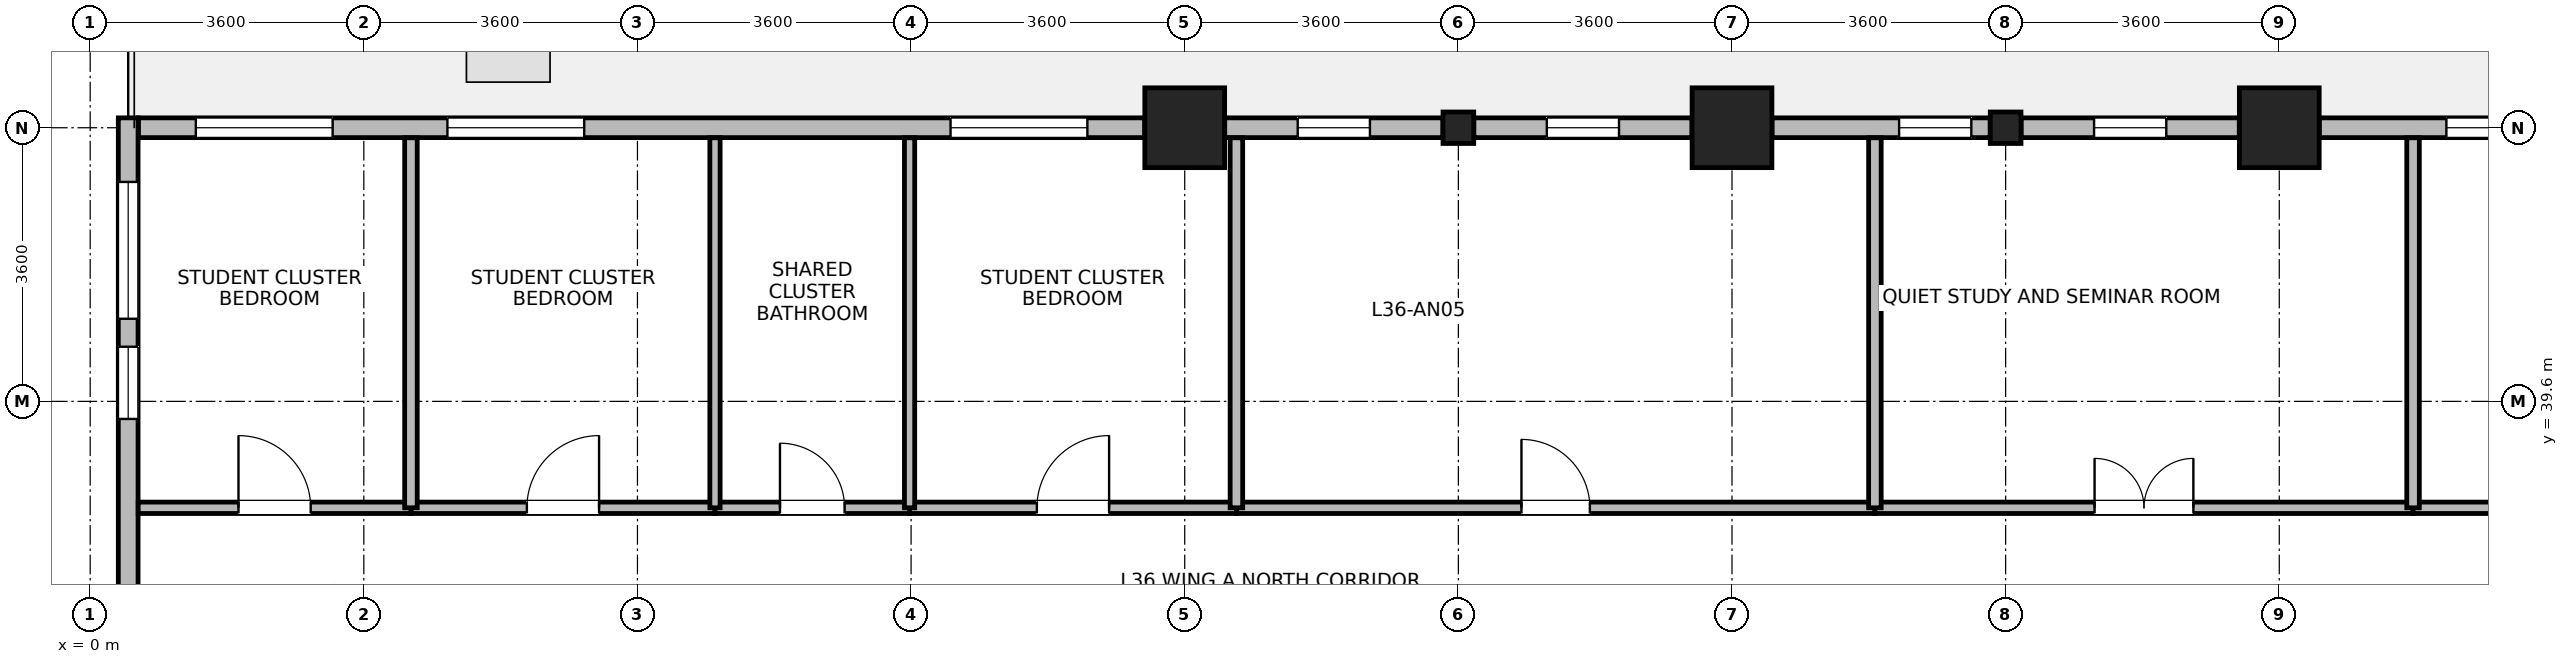
"""IFC4 building model, lengths in metres.
Left out: names, types, materials, properties, quantities, classifications, styles, units other than length and angle.
Written with IfcOpenShell. Run it as: python <this file> out.ifc"""

import sys

from ifc_helpers import new_model, si_unit, direction, frame, frame_2d, origin, origin_2d, place, context, subcontext, project, spatial, rectangle, i_section, extrude, source, transform, mapped, element, fill, save


model = new_model("IFC4")
c1 = context("Model", 3, precision=1e-05, world=origin(), true_north=direction((0.0, 1.0)))
c2 = subcontext(c1, "Body", "Model", "MODEL_VIEW")
j1 = project(units=[si_unit("LENGTHUNIT", "METRE"), si_unit("PLANEANGLEUNIT", "RADIAN")], contexts=[c1])
p1 = place(None, origin())
s1 = spatial("IfcSite", under=j1, at=p1, CompositionType="ELEMENT")
p2 = place(p1, origin())
s2 = spatial("IfcBuilding", under=s1, at=p2, CompositionType="ELEMENT")
p3 = place(p2, frame((0.0, 0.0, 143.9)))
s3 = spatial("IfcBuildingStorey", under=s2, at=p3, CompositionType="ELEMENT", Elevation=143.9)
m1 = source(origin(), c2, "Body", "SweptSolid", [
    extrude(rectangle(XDim=1.05, YDim=1.05, at=origin_2d()), origin(), (0.0, 0.0, 1.0), 3.7),
])
for number, where, z_axis, x_axis in (
    (1, (14.4, 43.2, 0.0), (0.0, 0.0, 1.0), (1.0, 0.0, 0.0)),
    (2, (21.6, 43.2, 0.0), (0.0, 0.0, 1.0), (1.0, 0.0, 0.0)),
    (3, (28.8, 43.2, 0.0), (0.0, 0.0, 1.0), (1.0, 0.0, 0.0)),
):
    element("IfcColumn", number, at=place(p3, frame(where, z_axis=z_axis, x_axis=x_axis)), inside=s3, PredefinedType="COLUMN", context=c2, shape_type="MappedRepresentation", body=[
        mapped(m1, transform((0.0, 0.0, 0.0), x_axis=(1.0, 0.0, 0.0), y_axis=(0.0, 1.0, 0.0), z_axis=(0.0, 0.0, 1.0), scale=1.0)),
    ])
m2 = source(origin(), c2, "Body", "SweptSolid", [
    extrude(i_section(OverallWidth=0.404, OverallDepth=0.414, WebThickness=0.021, FlangeThickness=0.028, FilletRadius=0.015, at=origin_2d()), origin(), (0.0, 0.0, 1.0), 3.7),
])
for number, where, z_axis, x_axis in (
    (4, (18.0, 43.2, 0.0), (0.0, 0.0, 1.0), (1.0, 0.0, 0.0)),
    (5, (25.2, 43.2, 0.0), (0.0, 0.0, 1.0), (1.0, 0.0, 0.0)),
):
    element("IfcColumn", number, at=place(p3, frame(where, z_axis=z_axis, x_axis=x_axis)), inside=s3, PredefinedType="COLUMN", context=c2, shape_type="MappedRepresentation", body=[
        mapped(m2, transform((0.0, 0.0, 0.0), x_axis=(1.0, 0.0, 0.0), y_axis=(0.0, 1.0, 0.0), z_axis=(0.0, 0.0, 1.0), scale=1.0)),
    ])
p4 = place(p3, frame((29.326, 43.2, 0.0), z_axis=(0.0, 0.0, 1.0), x_axis=(1.0, 0.0, 0.0)))
e6 = element("IfcWall", 6, at=p4, inside=s3, PredefinedType="STANDARD", context=c2, shape_type="SweptSolid", body=[
    extrude(rectangle(XDim=2.871, YDim=0.26, at=frame_2d((1.436, 0.0))), origin(), (0.0, 0.0, 1.0), 2.99),
])
p5 = place(p4, frame((1.673, 0.0, 0.85)))
e7 = element("IfcOpeningElement", 7, at=p5, cuts=e6, PredefinedType="OPENING", context=c2, shape_type="SweptSolid", body=[
    extrude(rectangle(XDim=0.95, YDim=1.75, at=frame_2d((0.475, 0.875))), frame((0.0, 0.14, 0.0), z_axis=(0.0, -1.0, 0.0), x_axis=(1.0, 0.0, 0.0)), (0.0, 0.0, 1.0), 0.28),
])
p6 = place(p3, frame((25.403, 43.2, 0.0), z_axis=(0.0, 0.0, 1.0), x_axis=(1.0, 0.0, 0.0)))
e8 = element("IfcWall", 8, at=p6, inside=s3, PredefinedType="STANDARD", context=c2, shape_type="SweptSolid", body=[
    extrude(rectangle(XDim=2.871, YDim=0.26, at=frame_2d((1.436, 0.0))), origin(), (0.0, 0.0, 1.0), 2.99),
])
p7 = place(p6, frame((0.96, 0.0, 0.85)))
e9 = element("IfcOpeningElement", 9, at=p7, cuts=e8, PredefinedType="OPENING", context=c2, shape_type="SweptSolid", body=[
    extrude(rectangle(XDim=0.95, YDim=1.75, at=frame_2d((0.475, 0.875))), frame((0.0, 0.14, 0.0), z_axis=(0.0, -1.0, 0.0), x_axis=(1.0, 0.0, 0.0)), (0.0, 0.0, 1.0), 0.28),
])
p8 = place(p3, frame((22.126, 43.2, 0.0), z_axis=(0.0, 0.0, 1.0), x_axis=(1.0, 0.0, 0.0)))
e10 = element("IfcWall", 10, at=p8, inside=s3, PredefinedType="STANDARD", context=c2, shape_type="SweptSolid", body=[
    extrude(rectangle(XDim=2.871, YDim=0.26, at=frame_2d((1.436, 0.0))), origin(), (0.0, 0.0, 1.0), 2.99),
])
p9 = place(p8, frame((1.673, 0.0, 0.85)))
e11 = element("IfcOpeningElement", 11, at=p9, cuts=e10, PredefinedType="OPENING", context=c2, shape_type="SweptSolid", body=[
    extrude(rectangle(XDim=0.95, YDim=1.75, at=frame_2d((0.475, 0.875))), frame((0.0, 0.14, 0.0), z_axis=(0.0, -1.0, 0.0), x_axis=(1.0, 0.0, 0.0)), (0.0, 0.0, 1.0), 0.28),
])
p10 = place(p3, frame((18.203, 43.2, 0.0), z_axis=(0.0, 0.0, 1.0), x_axis=(1.0, 0.0, 0.0)))
e12 = element("IfcWall", 12, at=p10, inside=s3, PredefinedType="STANDARD", context=c2, shape_type="SweptSolid", body=[
    extrude(rectangle(XDim=2.871, YDim=0.26, at=frame_2d((1.436, 0.0))), origin(), (0.0, 0.0, 1.0), 2.99),
])
p11 = place(p10, frame((0.96, 0.0, 0.85)))
e13 = element("IfcOpeningElement", 13, at=p11, cuts=e12, PredefinedType="OPENING", context=c2, shape_type="SweptSolid", body=[
    extrude(rectangle(XDim=0.95, YDim=1.75, at=frame_2d((0.475, 0.875))), frame((0.0, 0.14, 0.0), z_axis=(0.0, -1.0, 0.0), x_axis=(1.0, 0.0, 0.0)), (0.0, 0.0, 1.0), 0.28),
])
p12 = place(p3, frame((14.926, 43.2, 0.0), z_axis=(0.0, 0.0, 1.0), x_axis=(1.0, 0.0, 0.0)))
e14 = element("IfcWall", 14, at=p12, inside=s3, PredefinedType="STANDARD", context=c2, shape_type="SweptSolid", body=[
    extrude(rectangle(XDim=2.871, YDim=0.26, at=frame_2d((1.436, 0.0))), origin(), (0.0, 0.0, 1.0), 2.99),
])
p13 = place(p12, frame((0.96, 0.0, 0.85)))
e15 = element("IfcOpeningElement", 15, at=p13, cuts=e14, PredefinedType="OPENING", context=c2, shape_type="SweptSolid", body=[
    extrude(rectangle(XDim=0.95, YDim=1.75, at=frame_2d((0.475, 0.875))), frame((0.0, 0.14, 0.0), z_axis=(0.0, -1.0, 0.0), x_axis=(1.0, 0.0, 0.0)), (0.0, 0.0, 1.0), 0.28),
])
p14 = place(p3, frame((0.635, 43.2, 0.0), z_axis=(0.0, 0.0, 1.0), x_axis=(1.0, 0.0, 0.0)))
e16 = element("IfcWall", 16, at=p14, inside=s3, PredefinedType="STANDARD", context=c2, shape_type="SweptSolid", body=[
    extrude(rectangle(XDim=13.239, YDim=0.26, at=frame_2d((6.62, 0.0))), origin(), (0.0, 0.0, 1.0), 3.44),
])
p15 = place(p14, frame((0.755, 0.0, 0.85)))
e17 = element("IfcOpeningElement", 17, at=p15, cuts=e16, PredefinedType="OPENING", context=c2, shape_type="SweptSolid", body=[
    extrude(rectangle(XDim=1.8, YDim=1.85, at=frame_2d((0.9, 0.925))), frame((0.0, 0.14, 0.0), z_axis=(0.0, -1.0, 0.0), x_axis=(1.0, 0.0, 0.0)), (0.0, 0.0, 1.0), 0.28),
])
p16 = place(p14, frame((4.065, 0.0, 0.85)))
e18 = element("IfcOpeningElement", 18, at=p16, cuts=e16, PredefinedType="OPENING", context=c2, shape_type="SweptSolid", body=[
    extrude(rectangle(XDim=1.8, YDim=1.85, at=frame_2d((0.9, 0.925))), frame((0.0, 0.14, 0.0), z_axis=(0.0, -1.0, 0.0), x_axis=(1.0, 0.0, 0.0)), (0.0, 0.0, 1.0), 0.28),
])
p17 = place(p14, frame((10.684, 0.0, 0.85)))
e19 = element("IfcOpeningElement", 19, at=p17, cuts=e16, PredefinedType="OPENING", context=c2, shape_type="SweptSolid", body=[
    extrude(rectangle(XDim=1.8, YDim=1.85, at=frame_2d((0.9, 0.925))), frame((0.0, 0.14, 0.0), z_axis=(0.0, -1.0, 0.0), x_axis=(1.0, 0.0, 0.0)), (0.0, 0.0, 1.0), 0.28),
])
p18 = place(p3, frame((0.5, 36.358, 0.0), z_axis=(0.0, 0.0, 1.0), x_axis=(0.0, 1.0, 0.0)))
e20 = element("IfcWall", 20, at=p18, inside=s3, PredefinedType="STANDARD", context=c2, shape_type="SweptSolid", body=[
    extrude(rectangle(XDim=6.972, YDim=0.26, at=frame_2d((3.486, 0.0))), origin(), (0.0, 0.0, 1.0), 3.44),
])
p19 = place(p18, frame((4.329, 0.0, 0.85)))
e21 = element("IfcOpeningElement", 21, at=p19, cuts=e20, PredefinedType="OPENING", context=c2, shape_type="SweptSolid", body=[
    extrude(rectangle(XDim=1.8, YDim=1.85, at=frame_2d((0.9, 0.925))), frame((0.0, 0.14, 0.0), z_axis=(0.0, -1.0, 0.0), x_axis=(1.0, 0.0, 0.0)), (0.0, 0.0, 1.0), 0.28),
])
p20 = place(p18, frame((3.011, 0.0, 0.85)))
e22 = element("IfcOpeningElement", 22, at=p20, cuts=e20, PredefinedType="OPENING", context=c2, shape_type="SweptSolid", body=[
    extrude(rectangle(XDim=0.95, YDim=1.75, at=frame_2d((0.475, 0.875))), frame((0.0, 0.14, 0.0), z_axis=(0.0, -1.0, 0.0), x_axis=(1.0, 0.0, 0.0)), (0.0, 0.0, 1.0), 0.28),
])
p21 = place(p3, frame((15.08, 38.2, 0.0), z_axis=(0.0, 0.0, 1.0), x_axis=(1.0, 0.0, 0.0)))
e23 = element("IfcWall", 23, at=p21, inside=s3, PredefinedType="PARTITIONING", context=c2, shape_type="SweptSolid", body=[
    extrude(rectangle(XDim=8.4, YDim=0.15, at=frame_2d((4.2, 0.0))), origin(), (0.0, 0.0, 1.0), 3.44),
])
p22 = place(p21, frame((3.75, 0.0, 0.0)))
e24 = element("IfcOpeningElement", 24, at=p22, cuts=e23, PredefinedType="OPENING", context=c2, shape_type="SweptSolid", body=[
    extrude(rectangle(XDim=0.9, YDim=2.08, at=frame_2d((0.45, 1.04))), frame((0.0, 0.085, 0.0), z_axis=(0.0, -1.0, 0.0), x_axis=(1.0, 0.0, 0.0)), (0.0, 0.0, 1.0), 0.17),
])
p23 = place(p3, frame((23.48, 38.2, 0.0), z_axis=(0.0, 0.0, 1.0), x_axis=(1.0, 0.0, 0.0)))
e25 = element("IfcWall", 25, at=p23, inside=s3, PredefinedType="PARTITIONING", context=c2, shape_type="SweptSolid", body=[
    extrude(rectangle(XDim=7.08, YDim=0.15, at=frame_2d((3.54, 0.0))), origin(), (0.0, 0.0, 1.0), 3.44),
])
p24 = place(p23, frame((2.89, 0.0, 0.0)))
e26 = element("IfcOpeningElement", 26, at=p24, cuts=e25, PredefinedType="OPENING", context=c2, shape_type="SweptSolid", body=[
    extrude(rectangle(XDim=1.3, YDim=2.12, at=frame_2d((0.65, 1.06))), frame((0.0, 0.085, 0.0), z_axis=(0.0, -1.0, 0.0), x_axis=(1.0, 0.0, 0.0)), (0.0, 0.0, 1.0), 0.17),
])
p25 = place(p3, frame((30.56, 38.2, 0.0), z_axis=(0.0, 0.0, 1.0), x_axis=(1.0, 0.0, 0.0)))
e27 = element("IfcWall", 27, at=p25, inside=s3, PredefinedType="PARTITIONING", context=c2, shape_type="SweptSolid", body=[
    extrude(rectangle(XDim=4.8, YDim=0.15, at=frame_2d((2.4, 0.0))), origin(), (0.0, 0.0, 1.0), 3.44),
])
p26 = place(p25, frame((1.75, 0.0, 0.0)))
e28 = element("IfcOpeningElement", 28, at=p26, cuts=e27, PredefinedType="OPENING", context=c2, shape_type="SweptSolid", body=[
    extrude(rectangle(XDim=1.3, YDim=2.12, at=frame_2d((0.65, 1.06))), frame((0.0, 0.085, 0.0), z_axis=(0.0, -1.0, 0.0), x_axis=(1.0, 0.0, 0.0)), (0.0, 0.0, 1.0), 0.17),
])
p27 = place(p3, frame((10.78, 38.2, 0.0), z_axis=(0.0, 0.0, 1.0), x_axis=(1.0, 0.0, 0.0)))
e29 = element("IfcWall", 29, at=p27, inside=s3, PredefinedType="PARTITIONING", context=c2, shape_type="SweptSolid", body=[
    extrude(rectangle(XDim=4.3, YDim=0.15, at=frame_2d((2.15, 0.0))), origin(), (0.0, 0.0, 1.0), 3.44),
])
p28 = place(p27, frame((1.675, 0.0, 0.0)))
e30 = element("IfcOpeningElement", 30, at=p28, cuts=e29, PredefinedType="OPENING", context=c2, shape_type="SweptSolid", body=[
    extrude(rectangle(XDim=0.95, YDim=2.1, at=frame_2d((0.475, 1.05))), frame((0.0, 0.085, 0.0), z_axis=(0.0, -1.0, 0.0), x_axis=(1.0, 0.0, 0.0)), (0.0, 0.0, 1.0), 0.17),
])
p29 = place(p3, frame((4.22, 38.2, 0.0), z_axis=(0.0, 0.0, 1.0), x_axis=(1.0, 0.0, 0.0)))
e31 = element("IfcWall", 31, at=p29, inside=s3, PredefinedType="PARTITIONING", context=c2, shape_type="SweptSolid", body=[
    extrude(rectangle(XDim=4.0, YDim=0.15, at=frame_2d((2.0, 0.0))), origin(), (0.0, 0.0, 1.0), 3.44),
])
p30 = place(p29, frame((1.525, 0.0, 0.0)))
e32 = element("IfcOpeningElement", 32, at=p30, cuts=e31, PredefinedType="OPENING", context=c2, shape_type="SweptSolid", body=[
    extrude(rectangle(XDim=0.95, YDim=2.1, at=frame_2d((0.475, 1.05))), frame((0.0, 0.085, 0.0), z_axis=(0.0, -1.0, 0.0), x_axis=(1.0, 0.0, 0.0)), (0.0, 0.0, 1.0), 0.17),
])
p31 = place(p3, frame((0.632, 38.2, 0.0), z_axis=(0.0, 0.0, 1.0), x_axis=(1.0, 0.0, 0.0)))
e33 = element("IfcWall", 33, at=p31, inside=s3, PredefinedType="PARTITIONING", context=c2, shape_type="SweptSolid", body=[
    extrude(rectangle(XDim=3.588, YDim=0.15, at=frame_2d((1.794, 0.0))), origin(), (0.0, 0.0, 1.0), 3.44),
])
p32 = place(p31, frame((1.319, 0.0, 0.0)))
e34 = element("IfcOpeningElement", 34, at=p32, cuts=e33, PredefinedType="OPENING", context=c2, shape_type="SweptSolid", body=[
    extrude(rectangle(XDim=0.95, YDim=2.1, at=frame_2d((0.475, 1.05))), frame((0.0, 0.085, 0.0), z_axis=(0.0, -1.0, 0.0), x_axis=(1.0, 0.0, 0.0)), (0.0, 0.0, 1.0), 0.17),
])
p33 = place(p3, frame((8.22, 38.2, 0.0), z_axis=(0.0, 0.0, 1.0), x_axis=(1.0, 0.0, 0.0)))
e35 = element("IfcWall", 35, at=p33, inside=s3, PredefinedType="PARTITIONING", context=c2, shape_type="SweptSolid", body=[
    extrude(rectangle(XDim=2.56, YDim=0.15, at=frame_2d((1.28, 0.0))), origin(), (0.0, 0.0, 1.0), 3.44),
])
p34 = place(p33, frame((0.855, 0.0, 0.0)))
e36 = element("IfcOpeningElement", 36, at=p34, cuts=e35, PredefinedType="OPENING", context=c2, shape_type="SweptSolid", body=[
    extrude(rectangle(XDim=0.85, YDim=2.04, at=frame_2d((0.425, 1.02))), frame((0.0, 0.085, 0.0), z_axis=(0.0, -1.0, 0.0), x_axis=(1.0, 0.0, 0.0)), (0.0, 0.0, 1.0), 0.17),
])
p35 = place(p3, frame((4.22, 38.2, 0.0), z_axis=(0.0, 0.0, 1.0), x_axis=(0.0, 1.0, 0.0)))
e37 = element("IfcWall", 37, at=p35, inside=s3, PredefinedType="PARTITIONING", context=c2, shape_type="SweptSolid", body=[
    extrude(rectangle(XDim=4.868, YDim=0.165, at=frame_2d((2.434, 0.0))), origin(), (0.0, 0.0, 1.0), 3.44),
])
for number, where, z_axis, x_axis in (
    (38, (8.22, 38.2, 0.0), (0.0, 0.0, 1.0), (0.0, 1.0, 0.0)),
    (39, (10.78, 38.2, 0.0), (0.0, 0.0, 1.0), (0.0, 1.0, 0.0)),
):
    element("IfcWall", number, at=place(p3, frame(where, z_axis=z_axis, x_axis=x_axis)), inside=s3, PredefinedType="PARTITIONING", context=c2, shape_type="SweptSolid", body=[
        extrude(rectangle(XDim=4.868, YDim=0.135, at=frame_2d((2.434, 0.0))), origin(), (0.0, 0.0, 1.0), 3.44),
    ])
for number, where, z_axis, x_axis in (
    (40, (15.08, 38.2, 0.0), (0.0, 0.0, 1.0), (0.0, 1.0, 0.0)),
    (41, (23.48, 38.2, 0.0), (0.0, 0.0, 1.0), (0.0, 1.0, 0.0)),
    (42, (30.56, 38.2, 0.0), (0.0, 0.0, 1.0), (0.0, 1.0, 0.0)),
):
    element("IfcWall", number, at=place(p3, frame(where, z_axis=z_axis, x_axis=x_axis)), inside=s3, PredefinedType="PARTITIONING", context=c2, shape_type="SweptSolid", body=[
        extrude(rectangle(XDim=4.868, YDim=0.165, at=frame_2d((2.434, 0.0))), origin(), (0.0, 0.0, 1.0), 3.44),
    ])
p36 = place(p5, origin())
e43 = element("IfcWindow", 43, at=p36, inside=s3, PartitioningType="SINGLE_PANEL", PredefinedType="WINDOW", context=c2, shape_type="SweptSolid", body=[
    extrude(rectangle(XDim=0.95, YDim=1.75, at=frame_2d((0.475, 0.875))), frame((0.0, 0.03, 0.0), z_axis=(0.0, -1.0, 0.0), x_axis=(1.0, 0.0, 0.0)), (0.0, 0.0, 1.0), 0.06),
])
fill(e7, e43)
p37 = place(p7, origin())
e44 = element("IfcWindow", 44, at=p37, inside=s3, PartitioningType="SINGLE_PANEL", PredefinedType="WINDOW", context=c2, shape_type="SweptSolid", body=[
    extrude(rectangle(XDim=0.95, YDim=1.75, at=frame_2d((0.475, 0.875))), frame((0.0, 0.03, 0.0), z_axis=(0.0, -1.0, 0.0), x_axis=(1.0, 0.0, 0.0)), (0.0, 0.0, 1.0), 0.06),
])
fill(e9, e44)
p38 = place(p9, origin())
e45 = element("IfcWindow", 45, at=p38, inside=s3, PartitioningType="SINGLE_PANEL", PredefinedType="WINDOW", context=c2, shape_type="SweptSolid", body=[
    extrude(rectangle(XDim=0.95, YDim=1.75, at=frame_2d((0.475, 0.875))), frame((0.0, 0.03, 0.0), z_axis=(0.0, -1.0, 0.0), x_axis=(1.0, 0.0, 0.0)), (0.0, 0.0, 1.0), 0.06),
])
fill(e11, e45)
p39 = place(p11, origin())
e46 = element("IfcWindow", 46, at=p39, inside=s3, PartitioningType="SINGLE_PANEL", PredefinedType="WINDOW", context=c2, shape_type="SweptSolid", body=[
    extrude(rectangle(XDim=0.95, YDim=1.75, at=frame_2d((0.475, 0.875))), frame((0.0, 0.03, 0.0), z_axis=(0.0, -1.0, 0.0), x_axis=(1.0, 0.0, 0.0)), (0.0, 0.0, 1.0), 0.06),
])
fill(e13, e46)
p40 = place(p13, origin())
e47 = element("IfcWindow", 47, at=p40, inside=s3, PartitioningType="SINGLE_PANEL", PredefinedType="WINDOW", context=c2, shape_type="SweptSolid", body=[
    extrude(rectangle(XDim=0.95, YDim=1.75, at=frame_2d((0.475, 0.875))), frame((0.0, 0.03, 0.0), z_axis=(0.0, -1.0, 0.0), x_axis=(1.0, 0.0, 0.0)), (0.0, 0.0, 1.0), 0.06),
])
fill(e15, e47)
p41 = place(p15, origin())
e48 = element("IfcWindow", 48, at=p41, inside=s3, PartitioningType="SINGLE_PANEL", PredefinedType="WINDOW", context=c2, shape_type="SweptSolid", body=[
    extrude(rectangle(XDim=1.8, YDim=1.85, at=frame_2d((0.9, 0.925))), frame((0.0, 0.03, 0.0), z_axis=(0.0, -1.0, 0.0), x_axis=(1.0, 0.0, 0.0)), (0.0, 0.0, 1.0), 0.06),
])
fill(e17, e48)
p42 = place(p16, origin())
e49 = element("IfcWindow", 49, at=p42, inside=s3, PartitioningType="SINGLE_PANEL", PredefinedType="WINDOW", context=c2, shape_type="SweptSolid", body=[
    extrude(rectangle(XDim=1.8, YDim=1.85, at=frame_2d((0.9, 0.925))), frame((0.0, 0.03, 0.0), z_axis=(0.0, -1.0, 0.0), x_axis=(1.0, 0.0, 0.0)), (0.0, 0.0, 1.0), 0.06),
])
fill(e18, e49)
p43 = place(p17, origin())
e50 = element("IfcWindow", 50, at=p43, inside=s3, PartitioningType="SINGLE_PANEL", PredefinedType="WINDOW", context=c2, shape_type="SweptSolid", body=[
    extrude(rectangle(XDim=1.8, YDim=1.85, at=frame_2d((0.9, 0.925))), frame((0.0, 0.03, 0.0), z_axis=(0.0, -1.0, 0.0), x_axis=(1.0, 0.0, 0.0)), (0.0, 0.0, 1.0), 0.06),
])
fill(e19, e50)
p44 = place(p19, origin())
e51 = element("IfcWindow", 51, at=p44, inside=s3, PartitioningType="SINGLE_PANEL", PredefinedType="WINDOW", context=c2, shape_type="SweptSolid", body=[
    extrude(rectangle(XDim=1.8, YDim=1.85, at=frame_2d((0.9, 0.925))), frame((0.0, 0.03, 0.0), z_axis=(0.0, -1.0, 0.0), x_axis=(1.0, 0.0, 0.0)), (0.0, 0.0, 1.0), 0.06),
])
fill(e21, e51)
p45 = place(p20, origin())
e52 = element("IfcWindow", 52, at=p45, inside=s3, PartitioningType="SINGLE_PANEL", PredefinedType="WINDOW", context=c2, shape_type="SweptSolid", body=[
    extrude(rectangle(XDim=0.95, YDim=1.75, at=frame_2d((0.475, 0.875))), frame((0.0, 0.03, 0.0), z_axis=(0.0, -1.0, 0.0), x_axis=(1.0, 0.0, 0.0)), (0.0, 0.0, 1.0), 0.06),
])
fill(e22, e52)
p46 = place(p22, origin())
e53 = element("IfcDoor", 53, at=p46, inside=s3, OperationType="SINGLE_SWING_LEFT", PredefinedType="DOOR", context=c2, shape_type="SweptSolid", body=[
    extrude(rectangle(XDim=0.9, YDim=2.08, at=frame_2d((0.45, 1.04))), frame((0.0, 0.025, 0.0), z_axis=(0.0, -1.0, 0.0), x_axis=(1.0, 0.0, 0.0)), (0.0, 0.0, 1.0), 0.05),
])
fill(e24, e53)
p47 = place(p24, origin())
e54 = element("IfcDoor", 54, at=p47, inside=s3, OperationType="DOUBLE_DOOR_SINGLE_SWING", PredefinedType="DOOR", context=c2, shape_type="SweptSolid", body=[
    extrude(rectangle(XDim=1.3, YDim=2.12, at=frame_2d((0.65, 1.06))), frame((0.0, 0.025, 0.0), z_axis=(0.0, -1.0, 0.0), x_axis=(1.0, 0.0, 0.0)), (0.0, 0.0, 1.0), 0.05),
])
fill(e26, e54)
p48 = place(p28, origin())
e55 = element("IfcDoor", 55, at=p48, inside=s3, OperationType="SINGLE_SWING_RIGHT", PredefinedType="DOOR", context=c2, shape_type="SweptSolid", body=[
    extrude(rectangle(XDim=0.95, YDim=2.1, at=frame_2d((0.475, 1.05))), frame((0.0, 0.025, 0.0), z_axis=(0.0, -1.0, 0.0), x_axis=(1.0, 0.0, 0.0)), (0.0, 0.0, 1.0), 0.05),
])
fill(e30, e55)
p49 = place(p30, origin())
e56 = element("IfcDoor", 56, at=p49, inside=s3, OperationType="SINGLE_SWING_RIGHT", PredefinedType="DOOR", context=c2, shape_type="SweptSolid", body=[
    extrude(rectangle(XDim=0.95, YDim=2.1, at=frame_2d((0.475, 1.05))), frame((0.0, 0.025, 0.0), z_axis=(0.0, -1.0, 0.0), x_axis=(1.0, 0.0, 0.0)), (0.0, 0.0, 1.0), 0.05),
])
fill(e32, e56)
p50 = place(p32, origin())
e57 = element("IfcDoor", 57, at=p50, inside=s3, OperationType="SINGLE_SWING_LEFT", PredefinedType="DOOR", context=c2, shape_type="SweptSolid", body=[
    extrude(rectangle(XDim=0.95, YDim=2.1, at=frame_2d((0.475, 1.05))), frame((0.0, 0.025, 0.0), z_axis=(0.0, -1.0, 0.0), x_axis=(1.0, 0.0, 0.0)), (0.0, 0.0, 1.0), 0.05),
])
fill(e34, e57)
p51 = place(p34, origin())
e58 = element("IfcDoor", 58, at=p51, inside=s3, OperationType="SINGLE_SWING_LEFT", PredefinedType="DOOR", context=c2, shape_type="SweptSolid", body=[
    extrude(rectangle(XDim=0.85, YDim=2.04, at=frame_2d((0.425, 1.02))), frame((0.0, 0.025, 0.0), z_axis=(0.0, -1.0, 0.0), x_axis=(1.0, 0.0, 0.0)), (0.0, 0.0, 1.0), 0.05),
])
fill(e36, e58)
save(model, sys.argv[1])
